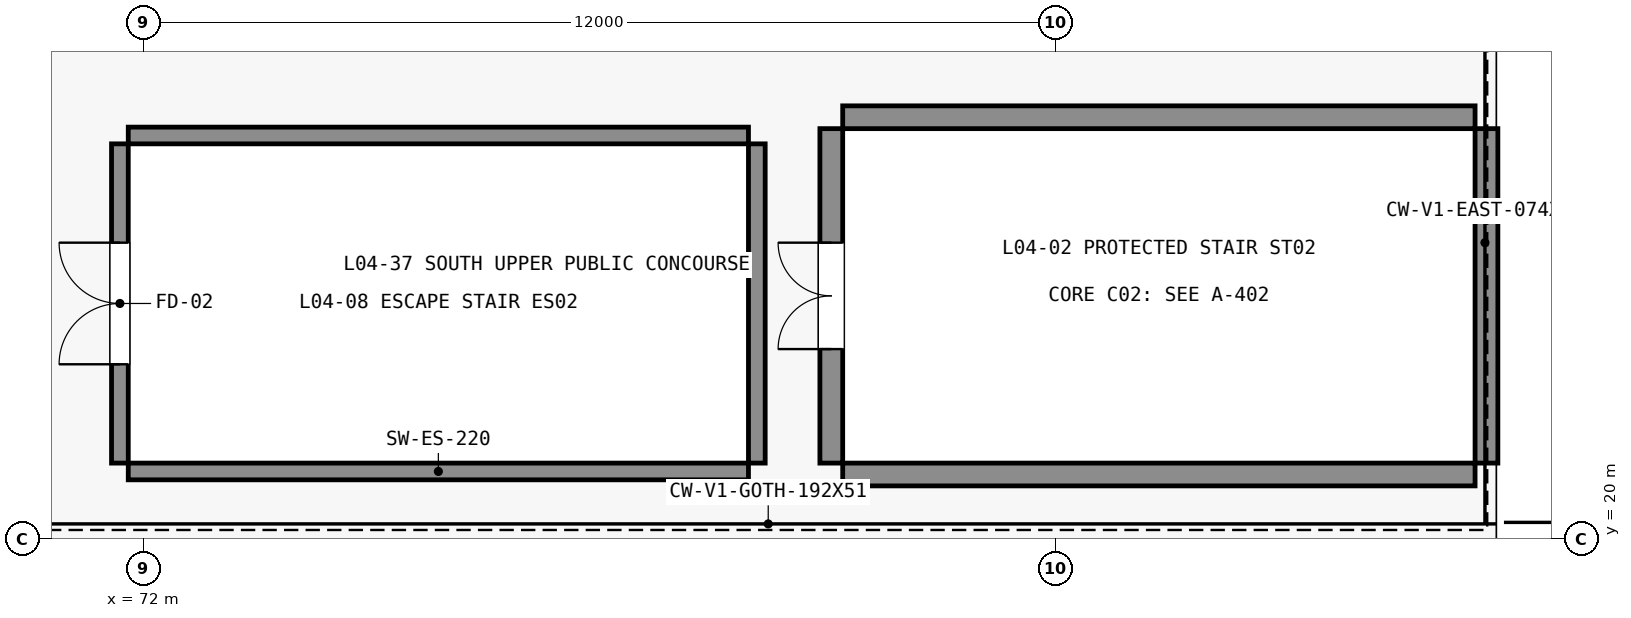
"""IFC4 building model, lengths in metres.
Left out: names, types, materials, properties, quantities, classifications, styles, units other than length and angle.
Written with IfcOpenShell. Run it as: python <this file> out.ifc"""

import sys

from ifc_helpers import new_model, si_unit, direction, frame, frame_2d, origin, place, context, subcontext, project, spatial, rectangle, extrude, element, fill, save


model = new_model("IFC4")
c1 = context("Model", 3, precision=1e-05, world=origin(), true_north=direction((0.0, 1.0)))
c2 = subcontext(c1, "Body", "Model", "MODEL_VIEW")
j1 = project(units=[si_unit("LENGTHUNIT", "METRE"), si_unit("PLANEANGLEUNIT", "RADIAN")], contexts=[c1])
p1 = place(None, origin())
s1 = spatial("IfcSite", under=j1, at=p1, CompositionType="ELEMENT")
p2 = place(p1, origin())
s2 = spatial("IfcBuilding", under=s1, at=p2, CompositionType="ELEMENT")
p3 = place(p2, frame((0.0, 0.0, 21.0)))
s3 = spatial("IfcBuildingStorey", under=s2, at=p3, CompositionType="ELEMENT", Elevation=21.0)
for number, where, z_axis, x_axis in (
    (1, (81.2, 20.85, 0.0), (0.0, 0.0, 1.0), (1.0, 0.0, 0.0)),
    (2, (81.2, 25.55, 0.0), (0.0, 0.0, 1.0), (1.0, 0.0, 0.0)),
):
    element("IfcWall", number, at=place(p3, frame(where, z_axis=z_axis, x_axis=x_axis)), inside=s3, PredefinedType="SHEAR", context=c2, shape_type="SweptSolid", body=[
        extrude(rectangle(XDim=8.32, YDim=0.3, at=frame_2d((4.16, 0.0))), origin(), (0.0, 0.0, 1.0), 5.06),
    ])
p4 = place(p3, frame((81.05, 21.0, 0.0), z_axis=(0.0, 0.0, 1.0), x_axis=(0.0, 1.0, 0.0)))
e3 = element("IfcWall", 3, at=p4, inside=s3, PredefinedType="SHEAR", context=c2, shape_type="SweptSolid", body=[
    extrude(rectangle(XDim=4.4, YDim=0.3, at=frame_2d((2.2, 0.0))), origin(), (0.0, 0.0, 1.0), 5.06),
])
p5 = place(p4, frame((1.5, 0.0, 0.0)))
e4 = element("IfcOpeningElement", 4, at=p5, cuts=e3, PredefinedType="OPENING", context=c2, shape_type="SweptSolid", body=[
    extrude(rectangle(XDim=1.4, YDim=2.2, at=frame_2d((0.7, 1.1))), frame((0.0, 0.16, 0.0), z_axis=(0.0, -1.0, 0.0), x_axis=(1.0, 0.0, 0.0)), (0.0, 0.0, 1.0), 0.32),
])
p6 = place(p3, frame((89.67, 21.0, 0.0), z_axis=(0.0, 0.0, 1.0), x_axis=(0.0, 1.0, 0.0)))
e5 = element("IfcWall", 5, at=p6, inside=s3, PredefinedType="SHEAR", context=c2, shape_type="SweptSolid", body=[
    extrude(rectangle(XDim=4.4, YDim=0.3, at=frame_2d((2.2, 0.0))), origin(), (0.0, 0.0, 1.0), 5.06),
])
for number, where, z_axis, x_axis in (
    (6, (71.8, 20.89, 0.0), (0.0, 0.0, 1.0), (1.0, 0.0, 0.0)),
    (7, (71.8, 25.31, 0.0), (0.0, 0.0, 1.0), (1.0, 0.0, 0.0)),
):
    element("IfcWall", number, at=place(p3, frame(where, z_axis=z_axis, x_axis=x_axis)), inside=s3, PredefinedType="SHEAR", context=c2, shape_type="SweptSolid", body=[
        extrude(rectangle(XDim=8.16, YDim=0.22, at=frame_2d((4.08, 0.0))), origin(), (0.0, 0.0, 1.0), 5.06),
    ])
p7 = place(p3, frame((71.69, 21.0, 0.0), z_axis=(0.0, 0.0, 1.0), x_axis=(0.0, 1.0, 0.0)))
e8 = element("IfcWall", 8, at=p7, inside=s3, PredefinedType="SHEAR", context=c2, shape_type="SweptSolid", body=[
    extrude(rectangle(XDim=4.2, YDim=0.22, at=frame_2d((2.1, 0.0))), origin(), (0.0, 0.0, 1.0), 5.06),
])
p8 = place(p7, frame((1.3, 0.0, 0.0)))
e9 = element("IfcOpeningElement", 9, at=p8, cuts=e8, PredefinedType="OPENING", context=c2, shape_type="SweptSolid", body=[
    extrude(rectangle(XDim=1.6, YDim=2.2, at=frame_2d((0.8, 1.1))), frame((0.0, 0.12, 0.0), z_axis=(0.0, -1.0, 0.0), x_axis=(1.0, 0.0, 0.0)), (0.0, 0.0, 1.0), 0.24),
])
p9 = place(p3, frame((80.07, 21.0, 0.0), z_axis=(0.0, 0.0, 1.0), x_axis=(0.0, 1.0, 0.0)))
e10 = element("IfcWall", 10, at=p9, inside=s3, PredefinedType="SHEAR", context=c2, shape_type="SweptSolid", body=[
    extrude(rectangle(XDim=4.2, YDim=0.22, at=frame_2d((2.1, 0.0))), origin(), (0.0, 0.0, 1.0), 5.06),
])
p10 = place(p5, origin())
e11 = element("IfcDoor", 11, at=p10, inside=s3, OperationType="DOUBLE_DOOR_SINGLE_SWING", PredefinedType="DOOR", context=c2, shape_type="SweptSolid", body=[
    extrude(rectangle(XDim=1.4, YDim=2.2, at=frame_2d((0.7, 1.1))), frame((0.0, 0.025, 0.0), z_axis=(0.0, -1.0, 0.0), x_axis=(1.0, 0.0, 0.0)), (0.0, 0.0, 1.0), 0.05),
])
fill(e4, e11)
p11 = place(p8, origin())
e12 = element("IfcDoor", 12, at=p11, inside=s3, OperationType="DOUBLE_DOOR_SINGLE_SWING", PredefinedType="DOOR", context=c2, shape_type="SweptSolid", body=[
    extrude(rectangle(XDim=1.6, YDim=2.2, at=frame_2d((0.8, 1.1))), frame((0.0, 0.025, 0.0), z_axis=(0.0, -1.0, 0.0), x_axis=(1.0, 0.0, 0.0)), (0.0, 0.0, 1.0), 0.05),
])
fill(e9, e12)
save(model, sys.argv[1])
